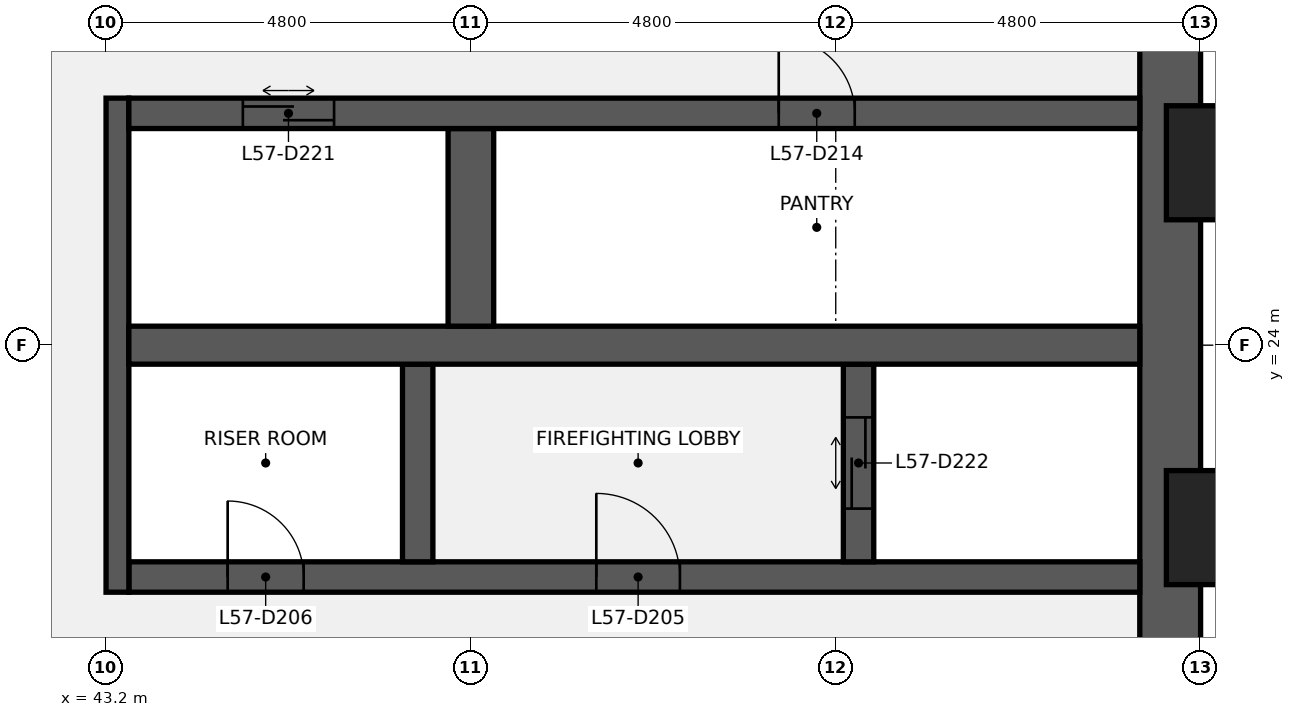
"""IFC4 building model, lengths in metres.
Left out: names, types, materials, properties, quantities, classifications, styles, units other than length and angle.
Written with IfcOpenShell. Run it as: python <this file> out.ifc"""

import sys

from ifc_helpers import new_model, si_unit, direction, frame, frame_2d, origin, origin_2d, place, context, subcontext, project, spatial, rectangle, extrude, element, fill, save


model = new_model("IFC4")
c1 = context("Model", 3, precision=1e-05, world=origin(), true_north=direction((0.0, 1.0)))
c2 = subcontext(c1, "Body", "Model", "MODEL_VIEW")
j1 = project(units=[si_unit("LENGTHUNIT", "METRE"), si_unit("PLANEANGLEUNIT", "RADIAN")], contexts=[c1])
p1 = place(None, origin())
s1 = spatial("IfcSite", under=j1, at=p1, CompositionType="ELEMENT")
p2 = place(p1, origin())
s2 = spatial("IfcBuilding", under=s1, at=p2, CompositionType="ELEMENT")
p3 = place(p2, frame((0.0, 0.0, 257.2)))
s3 = spatial("IfcBuildingStorey", under=s2, at=p3, CompositionType="ELEMENT", Elevation=257.2)
p4 = place(p3, frame((57.2, 38.4, 0.0), z_axis=(0.0, 0.0, 1.0), x_axis=(0.0, -1.0, 0.0)))
e1 = element("IfcWall", 1, at=p4, inside=s3, PredefinedType="SHEAR", context=c2, shape_type="SweptSolid", body=[
    extrude(rectangle(XDim=28.8, YDim=0.8, at=frame_2d((14.4, 0.0))), origin(), (0.0, 0.0, 1.0), 3.84),
])
p5 = place(p4, frame((18.45, 0.0, 0.9)))
e2 = element("IfcOpeningElement", 2, at=p5, cuts=e1, PredefinedType="OPENING", context=c2, shape_type="SweptSolid", body=[
    extrude(rectangle(XDim=1.5, YDim=1.5, at=frame_2d((0.75, 0.75))), frame((0.0, 0.41, 0.0), z_axis=(0.0, -1.0, 0.0), x_axis=(1.0, 0.0, 0.0)), (0.0, 0.0, 1.0), 0.82),
])
p6 = place(p4, frame((8.85, 0.0, 0.9)))
e3 = element("IfcOpeningElement", 3, at=p6, cuts=e1, PredefinedType="OPENING", context=c2, shape_type="SweptSolid", body=[
    extrude(rectangle(XDim=1.5, YDim=1.5, at=frame_2d((0.75, 0.75))), frame((0.0, 0.41, 0.0), z_axis=(0.0, -1.0, 0.0), x_axis=(1.0, 0.0, 0.0)), (0.0, 0.0, 1.0), 0.82),
])
p7 = place(p3, frame((43.5, 20.95, 0.0), z_axis=(0.0, 0.0, 1.0), x_axis=(1.0, 0.0, 0.0)))
e4 = element("IfcWall", 4, at=p7, inside=s3, PredefinedType="SHEAR", context=c2, shape_type="SweptSolid", body=[
    extrude(rectangle(XDim=13.3, YDim=0.4, at=frame_2d((6.65, 0.0))), origin(), (0.0, 0.0, 1.0), 3.84),
])
p8 = place(p7, frame((6.15, 0.0, 0.0)))
e5 = element("IfcOpeningElement", 5, at=p8, cuts=e4, PredefinedType="OPENING", context=c2, shape_type="SweptSolid", body=[
    extrude(rectangle(XDim=1.1, YDim=2.1, at=frame_2d((0.55, 1.05))), frame((0.0, 0.21, 0.0), z_axis=(0.0, -1.0, 0.0), x_axis=(1.0, 0.0, 0.0)), (0.0, 0.0, 1.0), 0.42),
])
p9 = place(p7, frame((1.3, 0.0, 0.0)))
e6 = element("IfcOpeningElement", 6, at=p9, cuts=e4, PredefinedType="OPENING", context=c2, shape_type="SweptSolid", body=[
    extrude(rectangle(XDim=1.0, YDim=2.1, at=frame_2d((0.5, 1.05))), frame((0.0, 0.21, 0.0), z_axis=(0.0, -1.0, 0.0), x_axis=(1.0, 0.0, 0.0)), (0.0, 0.0, 1.0), 0.42),
])
p10 = place(p3, frame((43.35, 20.75, 0.0), z_axis=(0.0, 0.0, 1.0), x_axis=(0.0, 1.0, 0.0)))
e7 = element("IfcWall", 7, at=p10, inside=s3, PredefinedType="SHEAR", context=c2, shape_type="SweptSolid", body=[
    extrude(rectangle(XDim=6.5, YDim=0.3, at=frame_2d((3.25, 0.0))), origin(), (0.0, 0.0, 1.0), 3.84),
])
p11 = place(p3, frame((53.1, 21.15, 0.0), z_axis=(0.0, 0.0, 1.0), x_axis=(0.0, 1.0, 0.0)))
e8 = element("IfcWall", 8, at=p11, inside=s3, PredefinedType="SHEAR", context=c2, shape_type="SweptSolid", body=[
    extrude(rectangle(XDim=2.6, YDim=0.4, at=frame_2d((1.3, 0.0))), origin(), (0.0, 0.0, 1.0), 3.84),
])
p12 = place(p11, frame((0.7, 0.0, 0.0)))
e9 = element("IfcOpeningElement", 9, at=p12, cuts=e8, PredefinedType="OPENING", context=c2, shape_type="SweptSolid", body=[
    extrude(rectangle(XDim=1.2, YDim=2.1, at=frame_2d((0.6, 1.05))), frame((0.0, 0.21, 0.0), z_axis=(0.0, -1.0, 0.0), x_axis=(1.0, 0.0, 0.0)), (0.0, 0.0, 1.0), 0.42),
])
p13 = place(p3, frame((47.3, 21.15, 0.0), z_axis=(0.0, 0.0, 1.0), x_axis=(0.0, 1.0, 0.0)))
e10 = element("IfcWall", 10, at=p13, inside=s3, PredefinedType="SHEAR", context=c2, shape_type="SweptSolid", body=[
    extrude(rectangle(XDim=2.6, YDim=0.4, at=frame_2d((1.3, 0.0))), origin(), (0.0, 0.0, 1.0), 3.84),
])
p14 = place(p3, frame((43.5, 24.0, 0.0), z_axis=(0.0, 0.0, 1.0), x_axis=(1.0, 0.0, 0.0)))
e11 = element("IfcWall", 11, at=p14, inside=s3, PredefinedType="SHEAR", context=c2, shape_type="SweptSolid", body=[
    extrude(rectangle(XDim=13.3, YDim=0.5, at=frame_2d((6.65, 0.0))), origin(), (0.0, 0.0, 1.0), 3.84),
])
p15 = place(p3, frame((48.0, 24.25, 0.0), z_axis=(0.0, 0.0, 1.0), x_axis=(0.0, 1.0, 0.0)))
e12 = element("IfcWall", 12, at=p15, inside=s3, PredefinedType="SHEAR", context=c2, shape_type="SweptSolid", body=[
    extrude(rectangle(XDim=2.6, YDim=0.6, at=frame_2d((1.3, 0.0))), origin(), (0.0, 0.0, 1.0), 3.84),
])
p16 = place(p3, frame((43.5, 27.05, 0.0), z_axis=(0.0, 0.0, 1.0), x_axis=(1.0, 0.0, 0.0)))
e13 = element("IfcWall", 13, at=p16, inside=s3, PredefinedType="SHEAR", context=c2, shape_type="SweptSolid", body=[
    extrude(rectangle(XDim=13.3, YDim=0.4, at=frame_2d((6.65, 0.0))), origin(), (0.0, 0.0, 1.0), 3.84),
])
p17 = place(p16, frame((8.55, 0.0, 0.0)))
e14 = element("IfcOpeningElement", 14, at=p17, cuts=e13, PredefinedType="OPENING", context=c2, shape_type="SweptSolid", body=[
    extrude(rectangle(XDim=1.0, YDim=2.1, at=frame_2d((0.5, 1.05))), frame((0.0, 0.21, 0.0), z_axis=(0.0, -1.0, 0.0), x_axis=(1.0, 0.0, 0.0)), (0.0, 0.0, 1.0), 0.42),
])
p18 = place(p16, frame((1.5, 0.0, 0.0)))
e15 = element("IfcOpeningElement", 15, at=p18, cuts=e13, PredefinedType="OPENING", context=c2, shape_type="SweptSolid", body=[
    extrude(rectangle(XDim=1.2, YDim=2.1, at=frame_2d((0.6, 1.05))), frame((0.0, 0.21, 0.0), z_axis=(0.0, -1.0, 0.0), x_axis=(1.0, 0.0, 0.0)), (0.0, 0.0, 1.0), 0.42),
])
for number, where, z_axis, x_axis in (
    (16, (58.35, 21.6, 0.0), (0.0, 0.0, 1.0), (0.0, 1.0, 0.0)),
    (17, (58.35, 26.4, 0.0), (0.0, 0.0, 1.0), (0.0, 1.0, 0.0)),
):
    element("IfcColumn", number, at=place(p3, frame(where, z_axis=z_axis, x_axis=x_axis)), inside=s3, PredefinedType="PILASTER", context=c2, shape_type="SweptSolid", body=[
        extrude(rectangle(XDim=2.4, YDim=1.5, at=origin_2d()), origin(), (0.0, 0.0, 1.0), 4.0),
    ])
p19 = place(p8, origin())
e18 = element("IfcDoor", 18, at=p19, inside=s3, OperationType="SINGLE_SWING_LEFT", PredefinedType="DOOR", context=c2, shape_type="SweptSolid", body=[
    extrude(rectangle(XDim=1.1, YDim=2.1, at=frame_2d((0.55, 1.05))), frame((0.0, 0.025, 0.0), z_axis=(0.0, -1.0, 0.0), x_axis=(1.0, 0.0, 0.0)), (0.0, 0.0, 1.0), 0.05),
])
fill(e5, e18)
p20 = place(p9, origin())
e19 = element("IfcDoor", 19, at=p20, inside=s3, OperationType="SINGLE_SWING_LEFT", PredefinedType="DOOR", context=c2, shape_type="SweptSolid", body=[
    extrude(rectangle(XDim=1.0, YDim=2.1, at=frame_2d((0.5, 1.05))), frame((0.0, 0.025, 0.0), z_axis=(0.0, -1.0, 0.0), x_axis=(1.0, 0.0, 0.0)), (0.0, 0.0, 1.0), 0.05),
])
fill(e6, e19)
p21 = place(p17, origin())
e20 = element("IfcDoor", 20, at=p21, inside=s3, OperationType="SINGLE_SWING_LEFT", PredefinedType="DOOR", context=c2, shape_type="SweptSolid", body=[
    extrude(rectangle(XDim=1.0, YDim=2.1, at=frame_2d((0.5, 1.05))), frame((0.0, 0.025, 0.0), z_axis=(0.0, -1.0, 0.0), x_axis=(1.0, 0.0, 0.0)), (0.0, 0.0, 1.0), 0.05),
])
fill(e14, e20)
p22 = place(p18, origin())
e21 = element("IfcDoor", 21, at=p22, inside=s3, OperationType="DOUBLE_DOOR_SLIDING", PredefinedType="DOOR", context=c2, shape_type="SweptSolid", body=[
    extrude(rectangle(XDim=1.2, YDim=2.1, at=frame_2d((0.6, 1.05))), frame((0.0, 0.025, 0.0), z_axis=(0.0, -1.0, 0.0), x_axis=(1.0, 0.0, 0.0)), (0.0, 0.0, 1.0), 0.05),
])
fill(e15, e21)
p23 = place(p12, origin())
e22 = element("IfcDoor", 22, at=p23, inside=s3, OperationType="DOUBLE_DOOR_SLIDING", PredefinedType="DOOR", context=c2, shape_type="SweptSolid", body=[
    extrude(rectangle(XDim=1.2, YDim=2.1, at=frame_2d((0.6, 1.05))), frame((0.0, 0.025, 0.0), z_axis=(0.0, -1.0, 0.0), x_axis=(1.0, 0.0, 0.0)), (0.0, 0.0, 1.0), 0.05),
])
fill(e9, e22)
save(model, sys.argv[1])
